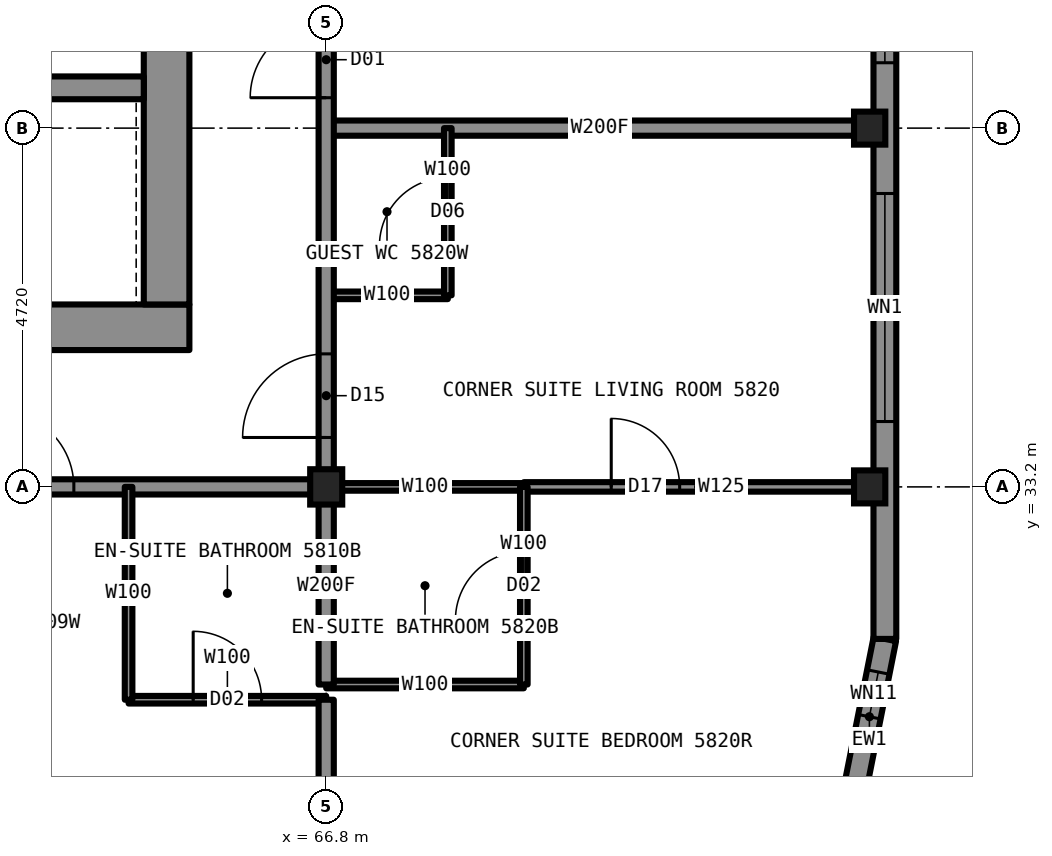
"""IFC4 building model, lengths in metres.
Left out: names, types, materials, properties, quantities, classifications, styles, units other than length and angle.
Written with IfcOpenShell. Run it as: python <this file> out.ifc"""

import sys

from ifc_helpers import new_model, si_unit, direction, frame, frame_2d, origin, origin_2d, place, context, subcontext, project, spatial, rectangle, i_section, extrude, element, fill, save


model = new_model("IFC4")
c1 = context("Model", 3, precision=1e-05, world=origin(), true_north=direction((0.0, 1.0)))
c2 = subcontext(c1, "Body", "Model", "MODEL_VIEW")
j1 = project(units=[si_unit("LENGTHUNIT", "METRE"), si_unit("PLANEANGLEUNIT", "RADIAN")], contexts=[c1])
p1 = place(None, origin())
s1 = spatial("IfcSite", under=j1, at=p1, CompositionType="ELEMENT")
p2 = place(p1, origin())
s2 = spatial("IfcBuilding", under=s1, at=p2, CompositionType="ELEMENT")
p3 = place(p2, frame((0.0, 0.0, 214.3)))
s3 = spatial("IfcBuildingStorey", under=s2, at=p3, CompositionType="ELEMENT", Elevation=214.3)
for number, where, z_axis, x_axis in (
    (1, (73.95, 33.2, 0.0), (0.0, 0.0, 1.0), (1.0, 0.0, 0.0)),
    (2, (73.95, 37.92, 0.0), (0.0, 0.0, 1.0), (1.0, 0.0, 0.0)),
):
    element("IfcColumn", number, at=place(p3, frame(where, z_axis=z_axis, x_axis=x_axis)), inside=s3, PredefinedType="COLUMN", context=c2, shape_type="SweptSolid", body=[
        extrude(i_section(OverallWidth=0.411, OverallDepth=0.434, WebThickness=0.036, FlangeThickness=0.057, at=origin_2d()), origin(), (0.0, 0.0, 1.0), 3.5),
    ])
p4 = place(p3, frame((66.8, 33.2, 0.0), z_axis=(0.0, 0.0, 1.0), x_axis=(1.0, 0.0, 0.0)))
e3 = element("IfcColumn", 3, at=p4, inside=s3, PredefinedType="COLUMN", context=c2, shape_type="SweptSolid", body=[
    extrude(i_section(OverallWidth=0.422, OverallDepth=0.465, WebThickness=0.045, FlangeThickness=0.073, at=origin_2d()), origin(), (0.0, 0.0, 1.0), 3.5),
])
p5 = place(p3, frame((45.0, 35.3, 0.0), z_axis=(0.0, 0.0, 1.0), x_axis=(1.0, 0.0, 0.0)))
e4 = element("IfcWall", 4, at=p5, inside=s3, PredefinedType="SHEAR", context=c2, shape_type="SweptSolid", body=[
    extrude(rectangle(XDim=20.0, YDim=0.6, at=frame_2d((10.0, 0.0))), origin(), (0.0, 0.0, 1.0), 3.5),
])
p6 = place(p3, frame((64.7, 35.6, 0.0), z_axis=(0.0, 0.0, 1.0), x_axis=(0.0, 1.0, 0.0)))
e5 = element("IfcWall", 5, at=p6, inside=s3, PredefinedType="SHEAR", context=c2, shape_type="SweptSolid", body=[
    extrude(rectangle(XDim=18.8, YDim=0.6, at=frame_2d((9.4, 0.0))), origin(), (0.0, 0.0, 1.0), 3.5),
])
p7 = place(p6, frame((13.4, 0.0, 0.0)))
e6 = element("IfcOpeningElement", 6, at=p7, cuts=e5, PredefinedType="OPENING", context=c2, shape_type="SweptSolid", body=[
    extrude(rectangle(XDim=1.8, YDim=2.2, at=frame_2d((0.9, 1.1))), frame((0.0, 0.31, 0.0), z_axis=(0.0, -1.0, 0.0), x_axis=(1.0, 0.0, 0.0)), (0.0, 0.0, 1.0), 0.62),
])
p8 = place(p6, frame((3.6, 0.0, 0.0)))
e7 = element("IfcOpeningElement", 7, at=p8, cuts=e5, PredefinedType="OPENING", context=c2, shape_type="SweptSolid", body=[
    extrude(rectangle(XDim=1.8, YDim=2.2, at=frame_2d((0.9, 1.1))), frame((0.0, 0.31, 0.0), z_axis=(0.0, -1.0, 0.0), x_axis=(1.0, 0.0, 0.0)), (0.0, 0.0, 1.0), 0.62),
])
p9 = place(p3, frame((45.6, 38.45, 0.0), z_axis=(0.0, 0.0, 1.0), x_axis=(1.0, 0.0, 0.0)))
e8 = element("IfcWall", 8, at=p9, inside=s3, PredefinedType="SHEAR", context=c2, shape_type="SweptSolid", body=[
    extrude(rectangle(XDim=18.8, YDim=0.3, at=frame_2d((9.4, 0.0))), origin(), (0.0, 0.0, 1.0), 3.5),
])
p10 = place(p9, frame((0.7, 0.0, 0.0)))
e9 = element("IfcOpeningElement", 9, at=p10, cuts=e8, PredefinedType="OPENING", context=c2, shape_type="SweptSolid", body=[
    extrude(rectangle(XDim=1.1, YDim=2.2, at=frame_2d((0.55, 1.1))), frame((0.0, 0.16, 0.0), z_axis=(0.0, -1.0, 0.0), x_axis=(1.0, 0.0, 0.0)), (0.0, 0.0, 1.0), 0.32),
])
p11 = place(p9, frame((3.4, 0.0, 0.0)))
e10 = element("IfcOpeningElement", 10, at=p11, cuts=e8, PredefinedType="OPENING", context=c2, shape_type="SweptSolid", body=[
    extrude(rectangle(XDim=1.1, YDim=2.2, at=frame_2d((0.55, 1.1))), frame((0.0, 0.16, 0.0), z_axis=(0.0, -1.0, 0.0), x_axis=(1.0, 0.0, 0.0)), (0.0, 0.0, 1.0), 0.32),
])
p12 = place(p9, frame((6.1, 0.0, 0.0)))
e11 = element("IfcOpeningElement", 11, at=p12, cuts=e8, PredefinedType="OPENING", context=c2, shape_type="SweptSolid", body=[
    extrude(rectangle(XDim=1.1, YDim=2.2, at=frame_2d((0.55, 1.1))), frame((0.0, 0.16, 0.0), z_axis=(0.0, -1.0, 0.0), x_axis=(1.0, 0.0, 0.0)), (0.0, 0.0, 1.0), 0.32),
])
p13 = place(p9, frame((8.8, 0.0, 0.0)))
e12 = element("IfcOpeningElement", 12, at=p13, cuts=e8, PredefinedType="OPENING", context=c2, shape_type="SweptSolid", body=[
    extrude(rectangle(XDim=1.1, YDim=2.2, at=frame_2d((0.55, 1.1))), frame((0.0, 0.16, 0.0), z_axis=(0.0, -1.0, 0.0), x_axis=(1.0, 0.0, 0.0)), (0.0, 0.0, 1.0), 0.32),
])
p14 = place(p3, frame((66.8, 33.2, 0.0), z_axis=(0.0, 0.0, 1.0), x_axis=(1.0, 0.0, 0.0)))
e13 = element("IfcWall", 13, at=p14, inside=s3, PredefinedType="PARTITIONING", context=c2, shape_type="SweptSolid", body=[
    extrude(rectangle(XDim=2.6, YDim=0.1, at=frame_2d((1.3, 0.0))), origin(), (0.0, 0.0, 1.0), 2.573),
])
p15 = place(p3, frame((43.2, 33.2, 0.0), z_axis=(0.0, 0.0, 1.0), x_axis=(1.0, 0.0, 0.0)))
e14 = element("IfcWall", 14, at=p15, inside=s3, PredefinedType="PARTITIONING", context=c2, shape_type="SweptSolid", body=[
    extrude(rectangle(XDim=23.6, YDim=0.2, at=frame_2d((11.8, 0.0))), origin(), (0.0, 0.0, 1.0), 3.33),
])
p16 = place(p15, frame((0.7, 0.0, 0.0)))
e15 = element("IfcOpeningElement", 15, at=p16, cuts=e14, PredefinedType="OPENING", context=c2, shape_type="SweptSolid", body=[
    extrude(rectangle(XDim=1.0, YDim=2.2, at=frame_2d((0.5, 1.1))), frame((0.0, 0.11, 0.0), z_axis=(0.0, -1.0, 0.0), x_axis=(1.0, 0.0, 0.0)), (0.0, 0.0, 1.0), 0.22),
])
p17 = place(p15, frame((6.98, 0.0, 0.0)))
e16 = element("IfcOpeningElement", 16, at=p17, cuts=e14, PredefinedType="OPENING", context=c2, shape_type="SweptSolid", body=[
    extrude(rectangle(XDim=1.0, YDim=2.2, at=frame_2d((0.5, 1.1))), frame((0.0, 0.11, 0.0), z_axis=(0.0, -1.0, 0.0), x_axis=(1.0, 0.0, 0.0)), (0.0, 0.0, 1.0), 0.22),
])
p18 = place(p15, frame((9.84, 0.0, 0.0)))
e17 = element("IfcOpeningElement", 17, at=p18, cuts=e14, PredefinedType="OPENING", context=c2, shape_type="SweptSolid", body=[
    extrude(rectangle(XDim=1.0, YDim=2.2, at=frame_2d((0.5, 1.1))), frame((0.0, 0.11, 0.0), z_axis=(0.0, -1.0, 0.0), x_axis=(1.0, 0.0, 0.0)), (0.0, 0.0, 1.0), 0.22),
])
p19 = place(p15, frame((16.42, 0.0, 0.0)))
e18 = element("IfcOpeningElement", 18, at=p19, cuts=e14, PredefinedType="OPENING", context=c2, shape_type="SweptSolid", body=[
    extrude(rectangle(XDim=1.0, YDim=2.2, at=frame_2d((0.5, 1.1))), frame((0.0, 0.11, 0.0), z_axis=(0.0, -1.0, 0.0), x_axis=(1.0, 0.0, 0.0)), (0.0, 0.0, 1.0), 0.22),
])
p20 = place(p15, frame((19.28, 0.0, 0.0)))
e19 = element("IfcOpeningElement", 19, at=p20, cuts=e14, PredefinedType="OPENING", context=c2, shape_type="SweptSolid", body=[
    extrude(rectangle(XDim=1.0, YDim=2.2, at=frame_2d((0.5, 1.1))), frame((0.0, 0.11, 0.0), z_axis=(0.0, -1.0, 0.0), x_axis=(1.0, 0.0, 0.0)), (0.0, 0.0, 1.0), 0.22),
])
p21 = place(p3, frame((69.4, 33.2, 0.0), z_axis=(0.0, 0.0, 1.0), x_axis=(1.0, 0.0, 0.0)))
e20 = element("IfcWall", 20, at=p21, inside=s3, PredefinedType="PARTITIONING", context=c2, shape_type="SweptSolid", body=[
    extrude(rectangle(XDim=4.6, YDim=0.125, at=frame_2d((2.3, 0.0))), origin(), (0.0, 0.0, 1.0), 2.573),
])
p22 = place(p21, frame((1.15, 0.0, 0.0)))
e21 = element("IfcOpeningElement", 21, at=p22, cuts=e20, PredefinedType="OPENING", context=c2, shape_type="SweptSolid", body=[
    extrude(rectangle(XDim=0.9, YDim=2.2, at=frame_2d((0.45, 1.1))), frame((0.0, 0.073, 0.0), z_axis=(0.0, -1.0, 0.0), x_axis=(1.0, 0.0, 0.0)), (0.0, 0.0, 1.0), 0.145),
])
p23 = place(p3, frame((66.8, 30.6, 0.0), z_axis=(0.0, 0.0, 1.0), x_axis=(1.0, 0.0, 0.0)))
e22 = element("IfcWall", 22, at=p23, inside=s3, PredefinedType="PARTITIONING", context=c2, shape_type="SweptSolid", body=[
    extrude(rectangle(XDim=2.6, YDim=0.1, at=frame_2d((1.3, 0.0))), origin(), (0.0, 0.0, 1.0), 3.33),
])
p24 = place(p3, frame((64.2, 30.4, 0.0), z_axis=(0.0, 0.0, 1.0), x_axis=(1.0, 0.0, 0.0)))
e23 = element("IfcWall", 23, at=p24, inside=s3, PredefinedType="PARTITIONING", context=c2, shape_type="SweptSolid", body=[
    extrude(rectangle(XDim=2.6, YDim=0.1, at=frame_2d((1.3, 0.0))), origin(), (0.0, 0.0, 1.0), 3.33),
])
p25 = place(p24, frame((0.85, 0.0, 0.0)))
e24 = element("IfcOpeningElement", 24, at=p25, cuts=e23, PredefinedType="OPENING", context=c2, shape_type="SweptSolid", body=[
    extrude(rectangle(XDim=0.9, YDim=2.1, at=frame_2d((0.45, 1.05))), frame((0.0, 0.06, 0.0), z_axis=(0.0, -1.0, 0.0), x_axis=(1.0, 0.0, 0.0)), (0.0, 0.0, 1.0), 0.12),
])
p26 = place(p3, frame((66.8, 37.92, 0.0), z_axis=(0.0, 0.0, 1.0), x_axis=(1.0, 0.0, 0.0)))
e25 = element("IfcWall", 25, at=p26, inside=s3, PredefinedType="PARTITIONING", context=c2, shape_type="SweptSolid", body=[
    extrude(rectangle(XDim=7.2, YDim=0.2, at=frame_2d((3.6, 0.0))), origin(), (0.0, 0.0, 1.0), 2.573),
])
p27 = place(p3, frame((66.8, 35.72, 0.0), z_axis=(0.0, 0.0, 1.0), x_axis=(1.0, 0.0, 0.0)))
e26 = element("IfcWall", 26, at=p27, inside=s3, PredefinedType="PARTITIONING", context=c2, shape_type="SweptSolid", body=[
    extrude(rectangle(XDim=1.6, YDim=0.1, at=frame_2d((0.8, 0.0))), origin(), (0.0, 0.0, 1.0), 3.33),
])
p28 = place(p3, frame((66.8, 33.2, 0.0), z_axis=(0.0, 0.0, 1.0), x_axis=(0.0, 1.0, 0.0)))
e27 = element("IfcWall", 27, at=p28, inside=s3, PredefinedType="PARTITIONING", context=c2, shape_type="SweptSolid", body=[
    extrude(rectangle(XDim=23.58, YDim=0.2, at=frame_2d((11.79, 0.0))), origin(), (0.0, 0.0, 1.0), 3.33),
])
p29 = place(p28, frame((5.12, 0.0, 0.0)))
e28 = element("IfcOpeningElement", 28, at=p29, cuts=e27, PredefinedType="OPENING", context=c2, shape_type="SweptSolid", body=[
    extrude(rectangle(XDim=1.0, YDim=2.2, at=frame_2d((0.5, 1.1))), frame((0.0, 0.11, 0.0), z_axis=(0.0, -1.0, 0.0), x_axis=(1.0, 0.0, 0.0)), (0.0, 0.0, 1.0), 0.22),
])
p30 = place(p28, frame((10.9, 0.0, 0.0)))
e29 = element("IfcOpeningElement", 29, at=p30, cuts=e27, PredefinedType="OPENING", context=c2, shape_type="SweptSolid", body=[
    extrude(rectangle(XDim=1.0, YDim=2.2, at=frame_2d((0.5, 1.1))), frame((0.0, 0.11, 0.0), z_axis=(0.0, -1.0, 0.0), x_axis=(1.0, 0.0, 0.0)), (0.0, 0.0, 1.0), 0.22),
])
p31 = place(p28, frame((17.31, 0.0, 0.0)))
e30 = element("IfcOpeningElement", 30, at=p31, cuts=e27, PredefinedType="OPENING", context=c2, shape_type="SweptSolid", body=[
    extrude(rectangle(XDim=1.0, YDim=2.2, at=frame_2d((0.5, 1.1))), frame((0.0, 0.11, 0.0), z_axis=(0.0, -1.0, 0.0), x_axis=(1.0, 0.0, 0.0)), (0.0, 0.0, 1.0), 0.22),
])
p32 = place(p28, frame((22.05, 0.0, 0.0)))
e31 = element("IfcOpeningElement", 31, at=p32, cuts=e27, PredefinedType="OPENING", context=c2, shape_type="SweptSolid", body=[
    extrude(rectangle(XDim=1.1, YDim=2.2, at=frame_2d((0.55, 1.1))), frame((0.0, 0.11, 0.0), z_axis=(0.0, -1.0, 0.0), x_axis=(1.0, 0.0, 0.0)), (0.0, 0.0, 1.0), 0.22),
])
p33 = place(p28, frame((0.65, 0.0, 0.0)))
e32 = element("IfcOpeningElement", 32, at=p33, cuts=e27, PredefinedType="OPENING", context=c2, shape_type="SweptSolid", body=[
    extrude(rectangle(XDim=1.1, YDim=2.2, at=frame_2d((0.55, 1.1))), frame((0.0, 0.11, 0.0), z_axis=(0.0, -1.0, 0.0), x_axis=(1.0, 0.0, 0.0)), (0.0, 0.0, 1.0), 0.22),
])
p34 = place(p3, frame((66.8, 26.0, 0.0), z_axis=(0.0, 0.0, 1.0), x_axis=(0.0, 1.0, 0.0)))
e33 = element("IfcWall", 33, at=p34, inside=s3, PredefinedType="PARTITIONING", context=c2, shape_type="SweptSolid", body=[
    extrude(rectangle(XDim=4.4, YDim=0.2, at=frame_2d((2.2, 0.0))), origin(), (0.0, 0.0, 1.0), 2.573),
])
p35 = place(p3, frame((66.8, 30.6, 0.0), z_axis=(0.0, 0.0, 1.0), x_axis=(0.0, 1.0, 0.0)))
e34 = element("IfcWall", 34, at=p35, inside=s3, PredefinedType="PARTITIONING", context=c2, shape_type="SweptSolid", body=[
    extrude(rectangle(XDim=2.6, YDim=0.2, at=frame_2d((1.3, 0.0))), origin(), (0.0, 0.0, 1.0), 2.573),
])
p36 = place(p3, frame((68.4, 35.72, 0.0), z_axis=(0.0, 0.0, 1.0), x_axis=(0.0, 1.0, 0.0)))
e35 = element("IfcWall", 35, at=p36, inside=s3, PredefinedType="PARTITIONING", context=c2, shape_type="SweptSolid", body=[
    extrude(rectangle(XDim=2.2, YDim=0.1, at=frame_2d((1.1, 0.0))), origin(), (0.0, 0.0, 1.0), 3.33),
])
p37 = place(p36, frame((0.65, 0.0, 0.0)))
e36 = element("IfcOpeningElement", 36, at=p37, cuts=e35, PredefinedType="OPENING", context=c2, shape_type="SweptSolid", body=[
    extrude(rectangle(XDim=0.9, YDim=2.1, at=frame_2d((0.45, 1.05))), frame((0.0, 0.06, 0.0), z_axis=(0.0, -1.0, 0.0), x_axis=(1.0, 0.0, 0.0)), (0.0, 0.0, 1.0), 0.12),
])
p38 = place(p3, frame((69.4, 30.6, 0.0), z_axis=(0.0, 0.0, 1.0), x_axis=(0.0, 1.0, 0.0)))
e37 = element("IfcWall", 37, at=p38, inside=s3, PredefinedType="PARTITIONING", context=c2, shape_type="SweptSolid", body=[
    extrude(rectangle(XDim=2.6, YDim=0.1, at=frame_2d((1.3, 0.0))), origin(), (0.0, 0.0, 1.0), 3.33),
])
p39 = place(p38, frame((0.85, 0.0, 0.0)))
e38 = element("IfcOpeningElement", 38, at=p39, cuts=e37, PredefinedType="OPENING", context=c2, shape_type="SweptSolid", body=[
    extrude(rectangle(XDim=0.9, YDim=2.1, at=frame_2d((0.45, 1.05))), frame((0.0, 0.06, 0.0), z_axis=(0.0, -1.0, 0.0), x_axis=(1.0, 0.0, 0.0)), (0.0, 0.0, 1.0), 0.12),
])
p40 = place(p3, frame((64.2, 30.4, 0.0), z_axis=(0.0, 0.0, 1.0), x_axis=(0.0, 1.0, 0.0)))
e39 = element("IfcWall", 39, at=p40, inside=s3, PredefinedType="PARTITIONING", context=c2, shape_type="SweptSolid", body=[
    extrude(rectangle(XDim=2.8, YDim=0.1, at=frame_2d((1.4, 0.0))), origin(), (0.0, 0.0, 1.0), 3.33),
])
p41 = place(p3, frame((73.743, 29.153, 0.0), z_axis=(0.0, 0.0, 1.0), x_axis=(0.195081421501, 0.980787050784, 0.0)))
e40 = element("IfcWall", 40, at=p41, inside=s3, PredefinedType="SOLIDWALL", context=c2, shape_type="SweptSolid", body=[
    extrude(rectangle(XDim=2.087, YDim=0.3, at=frame_2d((1.044, 0.0))), origin(), (0.0, 0.0, 1.0), 3.33),
])
p42 = place(p41, frame((1.044, 0.0, 1.3)))
e41 = element("IfcOpeningElement", 41, at=p42, cuts=e40, PredefinedType="OPENING", context=c2, shape_type="SweptSolid", body=[
    extrude(rectangle(XDim=0.6, YDim=1.0, at=frame_2d((0.3, 0.5))), frame((0.0, 0.16, 0.0), z_axis=(0.0, -1.0, 0.0), x_axis=(1.0, 0.0, 0.0)), (0.0, 0.0, 1.0), 0.32),
])
p43 = place(p3, frame((74.15, 31.2, 0.0), z_axis=(0.0, 0.0, 1.0), x_axis=(0.0, 1.0, 0.0)))
e42 = element("IfcWall", 42, at=p43, inside=s3, PredefinedType="SOLIDWALL", context=c2, shape_type="SweptSolid", body=[
    extrude(rectangle(XDim=27.6, YDim=0.3, at=frame_2d((13.8, 0.0))), origin(), (0.0, 0.0, 1.0), 2.63),
])
p44 = place(p43, frame((2.86, 0.0, 0.3)))
e43 = element("IfcOpeningElement", 43, at=p44, cuts=e42, PredefinedType="OPENING", context=c2, shape_type="SweptSolid", body=[
    extrude(rectangle(XDim=3.0, YDim=2.0, at=frame_2d((1.5, 1.0))), frame((0.0, 0.16, 0.0), z_axis=(0.0, -1.0, 0.0), x_axis=(1.0, 0.0, 0.0)), (0.0, 0.0, 1.0), 0.32),
])
p45 = place(p43, frame((7.58, 0.0, 0.3)))
e44 = element("IfcOpeningElement", 44, at=p45, cuts=e42, PredefinedType="OPENING", context=c2, shape_type="SweptSolid", body=[
    extrude(rectangle(XDim=3.0, YDim=2.0, at=frame_2d((1.5, 1.0))), frame((0.0, 0.16, 0.0), z_axis=(0.0, -1.0, 0.0), x_axis=(1.0, 0.0, 0.0)), (0.0, 0.0, 1.0), 0.32),
])
p46 = place(p43, frame((12.3, 0.0, 0.3)))
e45 = element("IfcOpeningElement", 45, at=p46, cuts=e42, PredefinedType="OPENING", context=c2, shape_type="SweptSolid", body=[
    extrude(rectangle(XDim=3.0, YDim=2.0, at=frame_2d((1.5, 1.0))), frame((0.0, 0.16, 0.0), z_axis=(0.0, -1.0, 0.0), x_axis=(1.0, 0.0, 0.0)), (0.0, 0.0, 1.0), 0.32),
])
p47 = place(p43, frame((17.02, 0.0, 0.3)))
e46 = element("IfcOpeningElement", 46, at=p47, cuts=e42, PredefinedType="OPENING", context=c2, shape_type="SweptSolid", body=[
    extrude(rectangle(XDim=3.0, YDim=2.0, at=frame_2d((1.5, 1.0))), frame((0.0, 0.16, 0.0), z_axis=(0.0, -1.0, 0.0), x_axis=(1.0, 0.0, 0.0)), (0.0, 0.0, 1.0), 0.32),
])
p48 = place(p43, frame((21.74, 0.0, 0.3)))
e47 = element("IfcOpeningElement", 47, at=p48, cuts=e42, PredefinedType="OPENING", context=c2, shape_type="SweptSolid", body=[
    extrude(rectangle(XDim=3.0, YDim=2.0, at=frame_2d((1.5, 1.0))), frame((0.0, 0.16, 0.0), z_axis=(0.0, -1.0, 0.0), x_axis=(1.0, 0.0, 0.0)), (0.0, 0.0, 1.0), 0.32),
])
p49 = place(p20, origin())
e48 = element("IfcDoor", 48, at=p49, inside=s3, OperationType="SINGLE_SWING_LEFT", PredefinedType="DOOR", context=c2, shape_type="SweptSolid", body=[
    extrude(rectangle(XDim=1.0, YDim=2.2, at=frame_2d((0.5, 1.1))), frame((0.0, 0.025, 0.0), z_axis=(0.0, -1.0, 0.0), x_axis=(1.0, 0.0, 0.0)), (0.0, 0.0, 1.0), 0.05),
])
fill(e19, e48)
p50 = place(p25, origin())
e49 = element("IfcDoor", 49, at=p50, inside=s3, OperationType="SINGLE_SWING_RIGHT", PredefinedType="DOOR", context=c2, shape_type="SweptSolid", body=[
    extrude(rectangle(XDim=0.9, YDim=2.1, at=frame_2d((0.45, 1.05))), frame((0.0, 0.025, 0.0), z_axis=(0.0, -1.0, 0.0), x_axis=(1.0, 0.0, 0.0)), (0.0, 0.0, 1.0), 0.05),
])
fill(e24, e49)
p51 = place(p29, origin())
e50 = element("IfcDoor", 50, at=p51, inside=s3, OperationType="SINGLE_SWING_LEFT", PredefinedType="DOOR", context=c2, shape_type="SweptSolid", body=[
    extrude(rectangle(XDim=1.0, YDim=2.2, at=frame_2d((0.5, 1.1))), frame((0.0, 0.025, 0.0), z_axis=(0.0, -1.0, 0.0), x_axis=(1.0, 0.0, 0.0)), (0.0, 0.0, 1.0), 0.05),
])
fill(e28, e50)
p52 = place(p33, origin())
e51 = element("IfcDoor", 51, at=p52, inside=s3, OperationType="SINGLE_SWING_LEFT", PredefinedType="DOOR", context=c2, shape_type="SweptSolid", body=[
    extrude(rectangle(XDim=1.1, YDim=2.2, at=frame_2d((0.55, 1.1))), frame((0.0, 0.025, 0.0), z_axis=(0.0, -1.0, 0.0), x_axis=(1.0, 0.0, 0.0)), (0.0, 0.0, 1.0), 0.05),
])
fill(e32, e51)
p53 = place(p39, origin())
e52 = element("IfcDoor", 52, at=p53, inside=s3, OperationType="SINGLE_SWING_RIGHT", PredefinedType="DOOR", context=c2, shape_type="SweptSolid", body=[
    extrude(rectangle(XDim=0.9, YDim=2.1, at=frame_2d((0.45, 1.05))), frame((0.0, 0.025, 0.0), z_axis=(0.0, -1.0, 0.0), x_axis=(1.0, 0.0, 0.0)), (0.0, 0.0, 1.0), 0.05),
])
fill(e38, e52)
p54 = place(p22, origin())
e53 = element("IfcDoor", 53, at=p54, inside=s3, OperationType="SINGLE_SWING_LEFT", PredefinedType="DOOR", context=c2, shape_type="SweptSolid", body=[
    extrude(rectangle(XDim=0.9, YDim=2.2, at=frame_2d((0.45, 1.1))), frame((0.0, 0.025, 0.0), z_axis=(0.0, -1.0, 0.0), x_axis=(1.0, 0.0, 0.0)), (0.0, 0.0, 1.0), 0.05),
])
fill(e21, e53)
p55 = place(p37, origin())
e54 = element("IfcDoor", 54, at=p55, inside=s3, OperationType="SINGLE_SWING_LEFT", PredefinedType="DOOR", context=c2, shape_type="SweptSolid", body=[
    extrude(rectangle(XDim=0.9, YDim=2.1, at=frame_2d((0.45, 1.05))), frame((0.0, 0.025, 0.0), z_axis=(0.0, -1.0, 0.0), x_axis=(1.0, 0.0, 0.0)), (0.0, 0.0, 1.0), 0.05),
])
fill(e36, e54)
p56 = place(p42, origin())
e55 = element("IfcWindow", 55, at=p56, inside=s3, PartitioningType="SINGLE_PANEL", PredefinedType="WINDOW", context=c2, shape_type="SweptSolid", body=[
    extrude(rectangle(XDim=0.6, YDim=1.0, at=frame_2d((0.3, 0.5))), frame((0.0, 0.13, 0.0), z_axis=(0.0, -1.0, 0.0), x_axis=(1.0, 0.0, 0.0)), (0.0, 0.0, 1.0), 0.06),
])
fill(e41, e55)
p57 = place(p44, origin())
e56 = element("IfcWindow", 56, at=p57, inside=s3, PartitioningType="SINGLE_PANEL", PredefinedType="WINDOW", context=c2, shape_type="SweptSolid", body=[
    extrude(rectangle(XDim=3.0, YDim=2.0, at=frame_2d((1.5, 1.0))), frame((0.0, 0.13, 0.0), z_axis=(0.0, -1.0, 0.0), x_axis=(1.0, 0.0, 0.0)), (0.0, 0.0, 1.0), 0.06),
])
fill(e43, e56)
p58 = place(p45, origin())
e57 = element("IfcWindow", 57, at=p58, inside=s3, PartitioningType="SINGLE_PANEL", PredefinedType="WINDOW", context=c2, shape_type="SweptSolid", body=[
    extrude(rectangle(XDim=3.0, YDim=2.0, at=frame_2d((1.5, 1.0))), frame((0.0, 0.13, 0.0), z_axis=(0.0, -1.0, 0.0), x_axis=(1.0, 0.0, 0.0)), (0.0, 0.0, 1.0), 0.06),
])
fill(e44, e57)
save(model, sys.argv[1])
